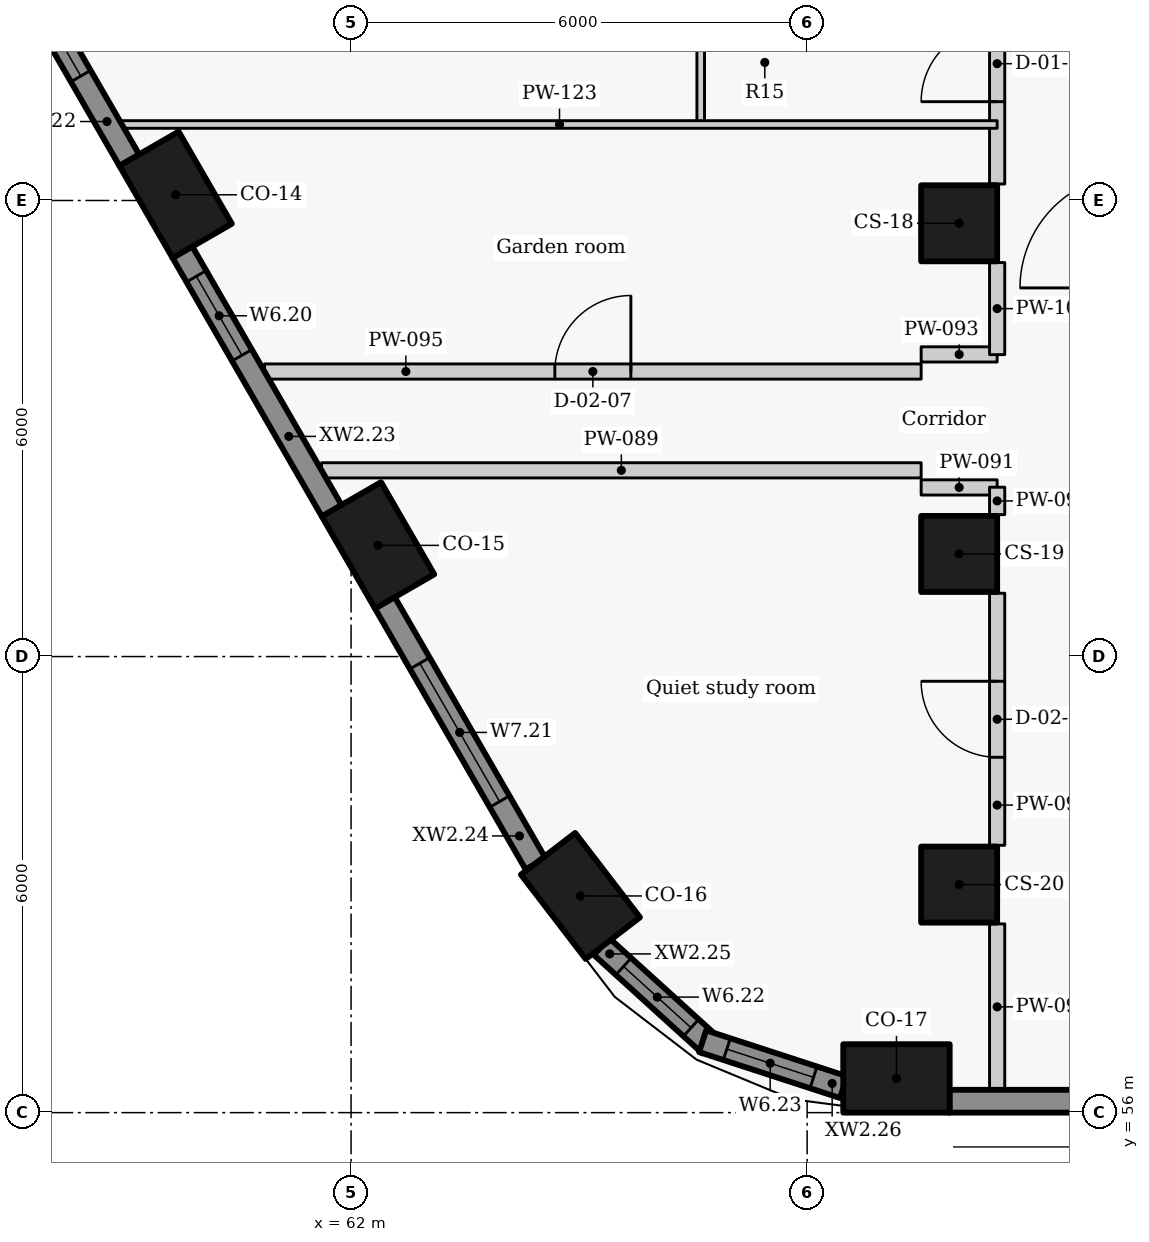
"""IFC4 building model, lengths in metres.
Left out: names, types, materials, properties, quantities, classifications, styles, units other than length and angle.
Written with IfcOpenShell. Run it as: python <this file> out.ifc"""

import sys

from ifc_helpers import new_model, si_unit, direction, frame, frame_2d, origin, origin_2d, place, context, subcontext, project, spatial, rectangle, extrude, element, fill, save


model = new_model("IFC4")
c1 = context("Model", 3, precision=1e-05, world=origin(), true_north=direction((0.0, 1.0)))
c2 = subcontext(c1, "Body", "Model", "MODEL_VIEW")
j1 = project(units=[si_unit("LENGTHUNIT", "METRE"), si_unit("PLANEANGLEUNIT", "RADIAN")], contexts=[c1])
p1 = place(None, origin())
s1 = spatial("IfcSite", under=j1, at=p1, CompositionType="ELEMENT")
p2 = place(p1, origin())
s2 = spatial("IfcBuilding", under=s1, at=p2, CompositionType="ELEMENT")
p3 = place(p2, frame((0.0, 0.0, 107.4)))
s3 = spatial("IfcBuildingStorey", under=s2, at=p3, CompositionType="ELEMENT", Elevation=107.4)
for number, where, z_axis, x_axis in (
    (1, (59.692, 68.075, 0.0), (0.0, 0.0, 1.0), (0.5, -0.866, 0.0)),
    (2, (62.354, 63.463, 0.0), (0.0, 0.0, 1.0), (0.5, -0.866, 0.0)),
    (3, (65.018, 58.851, 0.0), (0.0, 0.0, 1.0), (0.609, -0.793, 0.0)),
    (4, (69.175, 56.45, 0.0), (0.0, 0.0, 1.0), (1.0, 0.0, 0.0)),
):
    element("IfcColumn", number, at=place(p3, frame(where, z_axis=z_axis, x_axis=x_axis)), inside=s3, PredefinedType="COLUMN", context=c2, shape_type="SweptSolid", body=[
        extrude(rectangle(XDim=1.4, YDim=0.9, at=origin_2d()), origin(), (0.0, 0.0, 1.0), 3.3),
    ])
for number, where, z_axis, x_axis in (
    (5, (70.0, 67.7, 0.0), (0.0, 0.0, 1.0), (0.0, -1.0, 0.0)),
    (6, (70.0, 63.35, 0.0), (0.0, 0.0, 1.0), (0.0, -1.0, 0.0)),
    (7, (70.0, 59.0, 0.0), (0.0, 0.0, 1.0), (0.0, -1.0, 0.0)),
):
    element("IfcColumn", number, at=place(p3, frame(where, z_axis=z_axis, x_axis=x_axis)), inside=s3, PredefinedType="COLUMN", context=c2, shape_type="SweptSolid", body=[
        extrude(rectangle(XDim=1.0, YDim=1.0, at=origin_2d()), origin(), (0.0, 0.0, 1.0), 3.3),
    ])
p4 = place(p3, frame((57.265, 71.677, 0.0), z_axis=(0.0, 0.0, 1.0), x_axis=(0.500009139881, -0.866020126807, 0.0)))
e8 = element("IfcWall", 8, at=p4, inside=s3, PredefinedType="SOLIDWALL", context=c2, shape_type="SweptSolid", body=[
    extrude(rectangle(XDim=3.637, YDim=0.3, at=frame_2d((1.818, 0.0))), origin(), (0.0, 0.0, 1.0), 2.425),
])
p5 = place(p4, frame((0.857, 0.0, 0.9)))
e9 = element("IfcOpeningElement", 9, at=p5, cuts=e8, PredefinedType="OPENING", context=c2, shape_type="SweptSolid", body=[
    extrude(rectangle(XDim=1.5, YDim=1.1, at=frame_2d((0.75, 0.55))), frame((0.0, 0.16, 0.0), z_axis=(0.0, -1.0, 0.0), x_axis=(1.0, 0.0, 0.0)), (0.0, 0.0, 1.0), 0.32),
])
p6 = place(p3, frame((59.78, 67.323, 0.0), z_axis=(0.0, 0.0, 1.0), x_axis=(0.499957037901, -0.866050206543, 0.0)))
e10 = element("IfcWall", 10, at=p6, inside=s3, PredefinedType="SOLIDWALL", context=c2, shape_type="SweptSolid", body=[
    extrude(rectangle(XDim=3.934, YDim=0.3, at=frame_2d((1.967, 0.0))), origin(), (0.0, 0.0, 1.0), 2.425),
])
p7 = place(p6, frame((0.369, 0.0, 0.9)))
e11 = element("IfcOpeningElement", 11, at=p7, cuts=e10, PredefinedType="OPENING", context=c2, shape_type="SweptSolid", body=[
    extrude(rectangle(XDim=1.2, YDim=1.1, at=frame_2d((0.6, 0.55))), frame((0.0, 0.16, 0.0), z_axis=(0.0, -1.0, 0.0), x_axis=(1.0, 0.0, 0.0)), (0.0, 0.0, 1.0), 0.32),
])
p8 = place(p3, frame((62.443, 62.71, 0.0), z_axis=(0.0, 0.0, 1.0), x_axis=(0.500043828347, -0.866000097998, 0.0)))
e12 = element("IfcWall", 12, at=p8, inside=s3, PredefinedType="SOLIDWALL", context=c2, shape_type="SweptSolid", body=[
    extrude(rectangle(XDim=3.968, YDim=0.3, at=frame_2d((1.984, 0.0))), origin(), (0.0, 0.0, 1.0), 2.425),
])
p9 = place(p8, frame((0.922, 0.0, 0.9)))
e13 = element("IfcOpeningElement", 13, at=p9, cuts=e12, PredefinedType="OPENING", context=c2, shape_type="SweptSolid", body=[
    extrude(rectangle(XDim=2.1, YDim=1.1, at=frame_2d((1.05, 0.55))), frame((0.0, 0.16, 0.0), z_axis=(0.0, -1.0, 0.0), x_axis=(1.0, 0.0, 0.0)), (0.0, 0.0, 1.0), 0.32),
])
p10 = place(p3, frame((65.295, 58.186, 0.0), z_axis=(0.0, 0.0, 1.0), x_axis=(0.740421367382, -0.672142989791, 0.0)))
e14 = element("IfcWall", 14, at=p10, inside=s3, PredefinedType="SOLIDWALL", context=c2, shape_type="SweptSolid", body=[
    extrude(rectangle(XDim=1.927, YDim=0.3, at=frame_2d((0.964, 0.0))), origin(), (0.0, 0.0, 1.0), 2.425),
])
p11 = place(p10, frame((0.391, 0.0, 0.9)))
e15 = element("IfcOpeningElement", 15, at=p11, cuts=e14, PredefinedType="OPENING", context=c2, shape_type="SweptSolid", body=[
    extrude(rectangle(XDim=1.2, YDim=1.1, at=frame_2d((0.6, 0.55))), frame((0.0, 0.16, 0.0), z_axis=(0.0, -1.0, 0.0), x_axis=(1.0, 0.0, 0.0)), (0.0, 0.0, 1.0), 0.32),
])
p12 = place(p3, frame((66.625, 56.939, 0.0), z_axis=(0.0, 0.0, 1.0), x_axis=(0.950777961763, -0.309872985958, 0.0)))
e16 = element("IfcWall", 16, at=p12, inside=s3, PredefinedType="SOLIDWALL", context=c2, shape_type="SweptSolid", body=[
    extrude(rectangle(XDim=1.95, YDim=0.3, at=frame_2d((0.975, 0.0))), origin(), (0.0, 0.0, 1.0), 2.425),
])
p13 = place(p12, frame((0.335, 0.0, 0.9)))
e17 = element("IfcOpeningElement", 17, at=p13, cuts=e16, PredefinedType="OPENING", context=c2, shape_type="SweptSolid", body=[
    extrude(rectangle(XDim=1.2, YDim=1.1, at=frame_2d((0.6, 0.55))), frame((0.0, 0.16, 0.0), z_axis=(0.0, -1.0, 0.0), x_axis=(1.0, 0.0, 0.0)), (0.0, 0.0, 1.0), 0.32),
])
p14 = place(p3, frame((69.871, 56.15, 0.0), z_axis=(0.0, 0.0, 1.0), x_axis=(1.0, 0.0, 0.0)))
e18 = element("IfcWall", 18, at=p14, inside=s3, PredefinedType="SOLIDWALL", context=c2, shape_type="SweptSolid", body=[
    extrude(rectangle(XDim=19.94, YDim=0.3, at=frame_2d((9.97, 0.0))), origin(), (0.0, 0.0, 1.0), 2.425),
])
p15 = place(p3, frame((61.611, 64.45, 0.0), z_axis=(0.0, 0.0, 1.0), x_axis=(1.0, 0.0, 0.0)))
e19 = element("IfcWall", 19, at=p15, inside=s3, PredefinedType="PARTITIONING", context=c2, shape_type="SweptSolid", body=[
    extrude(rectangle(XDim=7.889, YDim=0.2, at=frame_2d((3.944, 0.0))), origin(), (0.0, 0.0, 1.0), 2.405),
])
for number, where, z_axis, x_axis in (
    (20, (69.5, 64.225, 0.0), (0.0, 0.0, 1.0), (1.0, 0.0, 0.0)),
    (21, (69.5, 65.975, 0.0), (0.0, 0.0, 1.0), (1.0, 0.0, 0.0)),
):
    element("IfcWall", number, at=place(p3, frame(where, z_axis=z_axis, x_axis=x_axis)), inside=s3, PredefinedType="PARTITIONING", context=c2, shape_type="SweptSolid", body=[
        extrude(rectangle(XDim=1.0, YDim=0.2, at=frame_2d((0.5, 0.0))), origin(), (0.0, 0.0, 1.0), 2.505),
    ])
p16 = place(p3, frame((60.861, 65.75, 0.0), z_axis=(0.0, 0.0, 1.0), x_axis=(1.0, 0.0, 0.0)))
e22 = element("IfcWall", 22, at=p16, inside=s3, PredefinedType="PARTITIONING", context=c2, shape_type="SweptSolid", body=[
    extrude(rectangle(XDim=8.639, YDim=0.2, at=frame_2d((4.32, 0.0))), origin(), (0.0, 0.0, 1.0), 2.405),
])
p17 = place(p16, frame((3.82, 0.0, 0.0)))
e23 = element("IfcOpeningElement", 23, at=p17, cuts=e22, PredefinedType="OPENING", context=c2, shape_type="SweptSolid", body=[
    extrude(rectangle(XDim=1.0, YDim=2.1, at=frame_2d((0.5, 1.05))), frame((0.0, 0.11, 0.0), z_axis=(0.0, -1.0, 0.0), x_axis=(1.0, 0.0, 0.0)), (0.0, 0.0, 1.0), 0.22),
])
p18 = place(p3, frame((70.5, 56.3, 0.0), z_axis=(0.0, 0.0, 1.0), x_axis=(0.0, 1.0, 0.0)))
e24 = element("IfcWall", 24, at=p18, inside=s3, PredefinedType="PARTITIONING", context=c2, shape_type="SweptSolid", body=[
    extrude(rectangle(XDim=2.183, YDim=0.2, at=frame_2d((1.091, 0.0))), origin(), (0.0, 0.0, 1.0), 3.025),
])
p19 = place(p3, frame((70.5, 59.517, 0.0), z_axis=(0.0, 0.0, 1.0), x_axis=(0.0, 1.0, 0.0)))
e25 = element("IfcWall", 25, at=p19, inside=s3, PredefinedType="PARTITIONING", context=c2, shape_type="SweptSolid", body=[
    extrude(rectangle(XDim=3.316, YDim=0.2, at=frame_2d((1.658, 0.0))), origin(), (0.0, 0.0, 1.0), 3.025),
])
p20 = place(p19, frame((1.158, 0.0, 0.0)))
e26 = element("IfcOpeningElement", 26, at=p20, cuts=e25, PredefinedType="OPENING", context=c2, shape_type="SweptSolid", body=[
    extrude(rectangle(XDim=1.0, YDim=2.1, at=frame_2d((0.5, 1.05))), frame((0.0, 0.11, 0.0), z_axis=(0.0, -1.0, 0.0), x_axis=(1.0, 0.0, 0.0)), (0.0, 0.0, 1.0), 0.22),
])
p21 = place(p3, frame((70.5, 63.867, 0.0), z_axis=(0.0, 0.0, 1.0), x_axis=(0.0, 1.0, 0.0)))
e27 = element("IfcWall", 27, at=p21, inside=s3, PredefinedType="PARTITIONING", context=c2, shape_type="SweptSolid", body=[
    extrude(rectangle(XDim=0.361, YDim=0.2, at=frame_2d((0.181, 0.0))), origin(), (0.0, 0.0, 1.0), 3.025),
])
p22 = place(p3, frame((70.5, 65.972, 0.0), z_axis=(0.0, 0.0, 1.0), x_axis=(0.0, 1.0, 0.0)))
e28 = element("IfcWall", 28, at=p22, inside=s3, PredefinedType="PARTITIONING", context=c2, shape_type="SweptSolid", body=[
    extrude(rectangle(XDim=1.211, YDim=0.2, at=frame_2d((0.605, 0.0))), origin(), (0.0, 0.0, 1.0), 3.025),
])
p23 = place(p3, frame((70.5, 68.217, 0.0), z_axis=(0.0, 0.0, 1.0), x_axis=(0.0, 1.0, 0.0)))
e29 = element("IfcWall", 29, at=p23, inside=s3, PredefinedType="PARTITIONING", context=c2, shape_type="SweptSolid", body=[
    extrude(rectangle(XDim=3.316, YDim=0.2, at=frame_2d((1.658, 0.0))), origin(), (0.0, 0.0, 1.0), 3.025),
])
p24 = place(p23, frame((1.083, 0.0, 0.0)))
e30 = element("IfcOpeningElement", 30, at=p24, cuts=e29, PredefinedType="OPENING", context=c2, shape_type="SweptSolid", body=[
    extrude(rectangle(XDim=1.0, YDim=2.1, at=frame_2d((0.5, 1.05))), frame((0.0, 0.11, 0.0), z_axis=(0.0, -1.0, 0.0), x_axis=(1.0, 0.0, 0.0)), (0.0, 0.0, 1.0), 0.22),
])
p25 = place(p3, frame((66.6, 69.0, 0.0), z_axis=(0.0, 0.0, 1.0), x_axis=(0.0, 1.0, 0.0)))
e31 = element("IfcWall", 31, at=p25, inside=s3, PredefinedType="PARTITIONING", context=c2, shape_type="SweptSolid", body=[
    extrude(rectangle(XDim=24.2, YDim=0.1, at=frame_2d((12.1, 0.0))), origin(), (0.0, 0.0, 1.0), 3.025),
])
p26 = place(p25, frame((1.147, 0.0, 0.0)))
e32 = element("IfcOpeningElement", 32, at=p26, cuts=e31, PredefinedType="OPENING", context=c2, shape_type="SweptSolid", body=[
    extrude(rectangle(XDim=0.9, YDim=2.1, at=frame_2d((0.45, 1.05))), frame((0.0, 0.06, 0.0), z_axis=(0.0, -1.0, 0.0), x_axis=(1.0, 0.0, 0.0)), (0.0, 0.0, 1.0), 0.12),
])
p27 = place(p25, frame((4.34, 0.0, 0.0)))
e33 = element("IfcOpeningElement", 33, at=p27, cuts=e31, PredefinedType="OPENING", context=c2, shape_type="SweptSolid", body=[
    extrude(rectangle(XDim=0.9, YDim=2.1, at=frame_2d((0.45, 1.05))), frame((0.0, 0.06, 0.0), z_axis=(0.0, -1.0, 0.0), x_axis=(1.0, 0.0, 0.0)), (0.0, 0.0, 1.0), 0.12),
])
p28 = place(p25, frame((8.244, 0.0, 0.0)))
e34 = element("IfcOpeningElement", 34, at=p28, cuts=e31, PredefinedType="OPENING", context=c2, shape_type="SweptSolid", body=[
    extrude(rectangle(XDim=0.9, YDim=2.1, at=frame_2d((0.45, 1.05))), frame((0.0, 0.06, 0.0), z_axis=(0.0, -1.0, 0.0), x_axis=(1.0, 0.0, 0.0)), (0.0, 0.0, 1.0), 0.12),
])
p29 = place(p25, frame((11.999, 0.0, 0.0)))
e35 = element("IfcOpeningElement", 35, at=p29, cuts=e31, PredefinedType="OPENING", context=c2, shape_type="SweptSolid", body=[
    extrude(rectangle(XDim=0.9, YDim=2.1, at=frame_2d((0.45, 1.05))), frame((0.0, 0.06, 0.0), z_axis=(0.0, -1.0, 0.0), x_axis=(1.0, 0.0, 0.0)), (0.0, 0.0, 1.0), 0.12),
])
p30 = place(p25, frame((14.896, 0.0, 0.0)))
e36 = element("IfcOpeningElement", 36, at=p30, cuts=e31, PredefinedType="OPENING", context=c2, shape_type="SweptSolid", body=[
    extrude(rectangle(XDim=0.9, YDim=2.1, at=frame_2d((0.45, 1.05))), frame((0.0, 0.06, 0.0), z_axis=(0.0, -1.0, 0.0), x_axis=(1.0, 0.0, 0.0)), (0.0, 0.0, 1.0), 0.12),
])
p31 = place(p25, frame((17.794, 0.0, 0.0)))
e37 = element("IfcOpeningElement", 37, at=p31, cuts=e31, PredefinedType="OPENING", context=c2, shape_type="SweptSolid", body=[
    extrude(rectangle(XDim=0.9, YDim=2.1, at=frame_2d((0.45, 1.05))), frame((0.0, 0.06, 0.0), z_axis=(0.0, -1.0, 0.0), x_axis=(1.0, 0.0, 0.0)), (0.0, 0.0, 1.0), 0.12),
])
p32 = place(p25, frame((21.496, 0.0, 0.0)))
e38 = element("IfcOpeningElement", 38, at=p32, cuts=e31, PredefinedType="OPENING", context=c2, shape_type="SweptSolid", body=[
    extrude(rectangle(XDim=0.9, YDim=2.1, at=frame_2d((0.45, 1.05))), frame((0.0, 0.06, 0.0), z_axis=(0.0, -1.0, 0.0), x_axis=(1.0, 0.0, 0.0)), (0.0, 0.0, 1.0), 0.12),
])
p33 = place(p3, frame((58.985, 69.0, 0.0), z_axis=(0.0, 0.0, 1.0), x_axis=(1.0, 0.0, 0.0)))
e39 = element("IfcWall", 39, at=p33, inside=s3, PredefinedType="PARTITIONING", context=c2, shape_type="SweptSolid", body=[
    extrude(rectangle(XDim=11.515, YDim=0.1, at=frame_2d((5.758, 0.0))), origin(), (0.0, 0.0, 1.0), 2.405),
])
p34 = place(p5, origin())
e40 = element("IfcWindow", 40, at=p34, inside=s3, PartitioningType="SINGLE_PANEL", PredefinedType="WINDOW", context=c2, shape_type="SweptSolid", body=[
    extrude(rectangle(XDim=1.5, YDim=1.1, at=frame_2d((0.75, 0.55))), frame((0.0, 0.03, 0.0), z_axis=(0.0, -1.0, 0.0), x_axis=(1.0, 0.0, 0.0)), (0.0, 0.0, 1.0), 0.06),
])
fill(e9, e40)
p35 = place(p7, origin())
e41 = element("IfcWindow", 41, at=p35, inside=s3, PartitioningType="SINGLE_PANEL", PredefinedType="WINDOW", context=c2, shape_type="SweptSolid", body=[
    extrude(rectangle(XDim=1.2, YDim=1.1, at=frame_2d((0.6, 0.55))), frame((0.0, 0.03, 0.0), z_axis=(0.0, -1.0, 0.0), x_axis=(1.0, 0.0, 0.0)), (0.0, 0.0, 1.0), 0.06),
])
fill(e11, e41)
p36 = place(p9, origin())
e42 = element("IfcWindow", 42, at=p36, inside=s3, PartitioningType="SINGLE_PANEL", PredefinedType="WINDOW", context=c2, shape_type="SweptSolid", body=[
    extrude(rectangle(XDim=2.1, YDim=1.1, at=frame_2d((1.05, 0.55))), frame((0.0, 0.03, 0.0), z_axis=(0.0, -1.0, 0.0), x_axis=(1.0, 0.0, 0.0)), (0.0, 0.0, 1.0), 0.06),
])
fill(e13, e42)
p37 = place(p11, origin())
e43 = element("IfcWindow", 43, at=p37, inside=s3, PartitioningType="SINGLE_PANEL", PredefinedType="WINDOW", context=c2, shape_type="SweptSolid", body=[
    extrude(rectangle(XDim=1.2, YDim=1.1, at=frame_2d((0.6, 0.55))), frame((0.0, 0.03, 0.0), z_axis=(0.0, -1.0, 0.0), x_axis=(1.0, 0.0, 0.0)), (0.0, 0.0, 1.0), 0.06),
])
fill(e15, e43)
p38 = place(p13, origin())
e44 = element("IfcWindow", 44, at=p38, inside=s3, PartitioningType="SINGLE_PANEL", PredefinedType="WINDOW", context=c2, shape_type="SweptSolid", body=[
    extrude(rectangle(XDim=1.2, YDim=1.1, at=frame_2d((0.6, 0.55))), frame((0.0, 0.03, 0.0), z_axis=(0.0, -1.0, 0.0), x_axis=(1.0, 0.0, 0.0)), (0.0, 0.0, 1.0), 0.06),
])
fill(e17, e44)
p39 = place(p20, origin())
e45 = element("IfcDoor", 45, at=p39, inside=s3, OperationType="SINGLE_SWING_RIGHT", PredefinedType="DOOR", context=c2, shape_type="SweptSolid", body=[
    extrude(rectangle(XDim=1.0, YDim=2.1, at=frame_2d((0.5, 1.05))), frame((0.0, 0.025, 0.0), z_axis=(0.0, -1.0, 0.0), x_axis=(1.0, 0.0, 0.0)), (0.0, 0.0, 1.0), 0.05),
])
fill(e26, e45)
p40 = place(p24, origin())
e46 = element("IfcDoor", 46, at=p40, inside=s3, OperationType="SINGLE_SWING_LEFT", PredefinedType="DOOR", context=c2, shape_type="SweptSolid", body=[
    extrude(rectangle(XDim=1.0, YDim=2.1, at=frame_2d((0.5, 1.05))), frame((0.0, 0.025, 0.0), z_axis=(0.0, -1.0, 0.0), x_axis=(1.0, 0.0, 0.0)), (0.0, 0.0, 1.0), 0.05),
])
fill(e30, e46)
p41 = place(p17, origin())
e47 = element("IfcDoor", 47, at=p41, inside=s3, OperationType="SINGLE_SWING_RIGHT", PredefinedType="DOOR", context=c2, shape_type="SweptSolid", body=[
    extrude(rectangle(XDim=1.0, YDim=2.1, at=frame_2d((0.5, 1.05))), frame((0.0, 0.025, 0.0), z_axis=(0.0, -1.0, 0.0), x_axis=(1.0, 0.0, 0.0)), (0.0, 0.0, 1.0), 0.05),
])
fill(e23, e47)
save(model, sys.argv[1])
